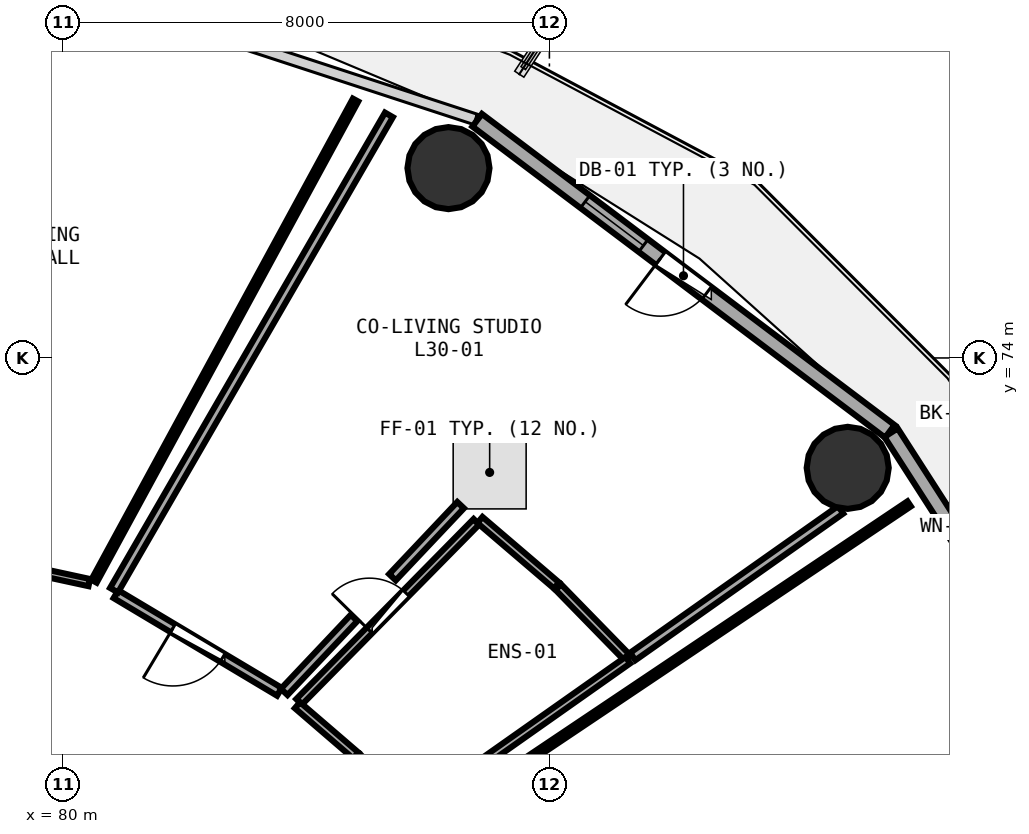
"""IFC4 building model, lengths in metres.
Left out: names, types, materials, properties, quantities, classifications, styles, units other than length and angle.
Written with IfcOpenShell. Run it as: python <this file> out.ifc"""

import sys

from ifc_helpers import new_model, si_unit, direction, frame, frame_2d, origin, origin_2d, place, context, subcontext, project, spatial, rectangle, circle, extrude, element, fill, save


model = new_model("IFC4")
c1 = context("Model", 3, precision=1e-05, world=origin(), true_north=direction((0.0, 1.0)))
c2 = subcontext(c1, "Body", "Model", "MODEL_VIEW")
j1 = project(units=[si_unit("LENGTHUNIT", "METRE"), si_unit("PLANEANGLEUNIT", "RADIAN")], contexts=[c1])
p1 = place(None, origin())
s1 = spatial("IfcSite", under=j1, at=p1, CompositionType="ELEMENT")
p2 = place(p1, origin())
s2 = spatial("IfcBuilding", under=s1, at=p2, CompositionType="ELEMENT")
p3 = place(p2, frame((0.0, 0.0, 117.6)))
s3 = spatial("IfcBuildingStorey", under=s2, at=p3, CompositionType="ELEMENT", Elevation=117.6)
for number, where, z_axis, x_axis in (
    (1, (92.906, 72.193, 0.0), (0.0, 0.0, 1.0), (1.0, 0.0, 0.0)),
    (2, (86.34, 77.122, 0.0), (0.0, 0.0, 1.0), (1.0, 0.0, 0.0)),
):
    element("IfcColumn", number, at=place(p3, frame(where, z_axis=z_axis, x_axis=x_axis)), inside=s3, PredefinedType="COLUMN", context=c2, shape_type="SweptSolid", body=[
        extrude(circle(Radius=0.675, at=origin_2d()), origin(), (0.0, 0.0, 1.0), 3.75),
    ])
p4 = place(p3, frame((98.048, 65.879, 0.0), z_axis=(0.0, 0.0, 1.0), x_axis=(-0.540620528459, 0.841266571432, 0.0)))
e3 = element("IfcWall", 3, at=p4, inside=s3, PredefinedType="SOLIDWALL", context=c2, shape_type="SweptSolid", body=[
    extrude(rectangle(XDim=8.193, YDim=0.26, at=frame_2d((4.096, 0.0))), origin(), (0.0, 0.0, 1.0), 3.475),
])
p5 = place(p4, frame((3.621, 0.0, 0.0)))
e4 = element("IfcOpeningElement", 4, at=p5, cuts=e3, PredefinedType="OPENING", context=c2, shape_type="SweptSolid", body=[
    extrude(rectangle(XDim=0.95, YDim=2.1, at=frame_2d((0.475, 1.05))), frame((0.0, 0.14, 0.0), z_axis=(0.0, -1.0, 0.0), x_axis=(1.0, 0.0, 0.0)), (0.0, 0.0, 1.0), 0.28),
])
p6 = place(p4, frame((4.921, 0.0, 0.85)))
e5 = element("IfcOpeningElement", 5, at=p6, cuts=e3, PredefinedType="OPENING", context=c2, shape_type="SweptSolid", body=[
    extrude(rectangle(XDim=1.2, YDim=1.45, at=frame_2d((0.6, 0.725))), frame((0.0, 0.14, 0.0), z_axis=(0.0, -1.0, 0.0), x_axis=(1.0, 0.0, 0.0)), (0.0, 0.0, 1.0), 0.28),
])
p7 = place(p3, frame((93.599, 72.793, 0.0), z_axis=(0.0, 0.0, 1.0), x_axis=(-0.798501507879, 0.601992808857, 0.0)))
e6 = element("IfcWall", 6, at=p7, inside=s3, PredefinedType="SOLIDWALL", context=c2, shape_type="SweptSolid", body=[
    extrude(rectangle(XDim=8.499, YDim=0.26, at=frame_2d((4.25, 0.0))), origin(), (0.0, 0.0, 1.0), 3.475),
])
p8 = place(p7, frame((3.775, 0.0, 0.0)))
e7 = element("IfcOpeningElement", 7, at=p8, cuts=e6, PredefinedType="OPENING", context=c2, shape_type="SweptSolid", body=[
    extrude(rectangle(XDim=0.95, YDim=2.1, at=frame_2d((0.475, 1.05))), frame((0.0, 0.14, 0.0), z_axis=(0.0, -1.0, 0.0), x_axis=(1.0, 0.0, 0.0)), (0.0, 0.0, 1.0), 0.28),
])
p9 = place(p7, frame((5.075, 0.0, 0.85)))
e8 = element("IfcOpeningElement", 8, at=p9, cuts=e6, PredefinedType="OPENING", context=c2, shape_type="SweptSolid", body=[
    extrude(rectangle(XDim=1.2, YDim=1.45, at=frame_2d((0.6, 0.725))), frame((0.0, 0.14, 0.0), z_axis=(0.0, -1.0, 0.0), x_axis=(1.0, 0.0, 0.0)), (0.0, 0.0, 1.0), 0.28),
])
p10 = place(p3, frame((83.883, 68.345, 0.0), z_axis=(0.0, 0.0, 1.0), x_axis=(0.70168270288, 0.712489567979, 0.0)))
e9 = element("IfcWall", 9, at=p10, inside=s3, PredefinedType="PLUMBINGWALL", context=c2, shape_type="SweptSolid", body=[
    extrude(rectangle(XDim=4.157, YDim=0.13, at=frame_2d((2.078, 0.0))), origin(), (0.0, 0.0, 1.0), 3.175),
])
p11 = place(p10, frame((1.648, 0.0, 0.0)))
e10 = element("IfcOpeningElement", 10, at=p11, cuts=e9, PredefinedType="OPENING", context=c2, shape_type="SweptSolid", body=[
    extrude(rectangle(XDim=0.86, YDim=2.05, at=frame_2d((0.43, 1.025))), frame((0.0, 0.075, 0.0), z_axis=(0.0, -1.0, 0.0), x_axis=(1.0, 0.0, 0.0)), (0.0, 0.0, 1.0), 0.15),
])
p12 = place(p3, frame((83.56, 68.51, 0.0), z_axis=(0.0, 0.0, 1.0), x_axis=(-0.858523244826, 0.512774646501, 0.0)))
e11 = element("IfcWall", 11, at=p12, inside=s3, PredefinedType="PARTITIONING", context=c2, shape_type="SweptSolid", body=[
    extrude(rectangle(XDim=3.131, YDim=0.15, at=frame_2d((1.565, 0.0))), origin(), (0.0, 0.0, 1.0), 2.925),
])
p13 = place(p12, frame((1.09, 0.0, 0.0)))
e12 = element("IfcOpeningElement", 12, at=p13, cuts=e11, PredefinedType="OPENING", context=c2, shape_type="SweptSolid", body=[
    extrude(rectangle(XDim=0.95, YDim=2.08, at=frame_2d((0.475, 1.04))), frame((0.0, 0.085, 0.0), z_axis=(0.0, -1.0, 0.0), x_axis=(1.0, 0.0, 0.0)), (0.0, 0.0, 1.0), 0.17),
])
p14 = place(p3, frame((80.432, 70.306, 0.0), z_axis=(0.0, 0.0, 1.0), x_axis=(-0.977331177519, 0.211716247484, 0.0)))
e13 = element("IfcWall", 13, at=p14, inside=s3, PredefinedType="PARTITIONING", context=c2, shape_type="SweptSolid", body=[
    extrude(rectangle(XDim=6.181, YDim=0.12, at=frame_2d((3.09, 0.0))), origin(), (0.0, 0.0, 1.0), 3.235),
])
p15 = place(p14, frame((2.64, 0.0, 0.0)))
e14 = element("IfcOpeningElement", 14, at=p15, cuts=e13, PredefinedType="OPENING", context=c2, shape_type="SweptSolid", body=[
    extrude(rectangle(XDim=0.9, YDim=2.08, at=frame_2d((0.45, 1.04))), frame((0.0, 0.07, 0.0), z_axis=(0.0, -1.0, 0.0), x_axis=(1.0, 0.0, 0.0)), (0.0, 0.0, 1.0), 0.14),
])
p16 = place(p3, frame((85.716, 66.536, 0.0), z_axis=(0.0, 0.0, 1.0), x_axis=(-0.695817197704, 0.718218927194, 0.0)))
e15 = element("IfcWall", 15, at=p16, inside=s3, PredefinedType="PLUMBINGWALL", context=c2, shape_type="SweptSolid", body=[
    extrude(rectangle(XDim=1.253, YDim=0.13, at=frame_2d((0.627, 0.0))), origin(), (0.0, 0.0, 1.0), 2.925),
])
p17 = place(p3, frame((84.815, 67.464, 0.0), z_axis=(0.0, 0.0, 1.0), x_axis=(-0.757933178543, 0.652332198242, 0.0)))
e16 = element("IfcWall", 16, at=p17, inside=s3, PredefinedType="PLUMBINGWALL", context=c2, shape_type="SweptSolid", body=[
    extrude(rectangle(XDim=1.265, YDim=0.13, at=frame_2d((0.632, 0.0))), origin(), (0.0, 0.0, 1.0), 3.48),
])
p18 = place(p3, frame((86.857, 71.336, 0.0), z_axis=(0.0, 0.0, 1.0), x_axis=(0.760056789813, -0.649856658241, 0.0)))
e17 = element("IfcWall", 17, at=p18, inside=s3, PredefinedType="PLUMBINGWALL", context=c2, shape_type="SweptSolid", body=[
    extrude(rectangle(XDim=1.657, YDim=0.13, at=frame_2d((0.829, 0.0))), origin(), (0.0, 0.0, 1.0), 3.48),
])
p19 = place(p3, frame((88.146, 70.232, 0.0), z_axis=(0.0, 0.0, 1.0), x_axis=(0.698431593966, -0.715676818508, 0.0)))
e18 = element("IfcWall", 18, at=p19, inside=s3, PredefinedType="PLUMBINGWALL", context=c2, shape_type="SweptSolid", body=[
    extrude(rectangle(XDim=1.642, YDim=0.13, at=frame_2d((0.821, 0.0))), origin(), (0.0, 0.0, 1.0), 2.925),
])
p20 = place(p3, frame((89.291, 69.031, 0.0), z_axis=(0.0, 0.0, 1.0), x_axis=(-0.817498099131, -0.575931296178, 0.0)))
e19 = element("IfcWall", 19, at=p20, inside=s3, PredefinedType="PLUMBINGWALL", context=c2, shape_type="SweptSolid", body=[
    extrude(rectangle(XDim=4.336, YDim=0.13, at=frame_2d((2.168, 0.0))), origin(), (0.0, 0.0, 1.0), 3.175),
])
p21 = place(p3, frame((80.84, 70.181, 0.0), z_axis=(0.0, 0.0, 1.0), x_axis=(0.500668535271, 0.865639080558, 0.0)))
e20 = element("IfcWall", 20, at=p21, inside=s3, PredefinedType="PARTITIONING", context=c2, shape_type="SweptSolid", body=[
    extrude(rectangle(XDim=9.03, YDim=0.15, at=frame_2d((4.515, 0.0))), origin(), (0.0, 0.0, 1.0), 2.925),
])
p22 = place(p3, frame((92.79, 71.502, 0.0), z_axis=(0.0, 0.0, 1.0), x_axis=(-0.817102044885, -0.576493060015, 0.0)))
e21 = element("IfcWall", 21, at=p22, inside=s3, PredefinedType="PARTITIONING", context=c2, shape_type="SweptSolid", body=[
    extrude(rectangle(XDim=4.185, YDim=0.15, at=frame_2d((2.092, 0.0))), origin(), (0.0, 0.0, 1.0), 3.235),
])
p23 = place(p3, frame((86.54, 71.58, 0.0), z_axis=(0.0, 0.0, 1.0), x_axis=(-0.68661474407, -0.727021453071, 0.0)))
e22 = element("IfcWall", 22, at=p23, inside=s3, PredefinedType="PARTITIONING", context=c2, shape_type="SweptSolid", body=[
    extrude(rectangle(XDim=1.631, YDim=0.15, at=frame_2d((0.816, 0.0))), origin(), (0.0, 0.0, 1.0), 3.175),
])
p24 = place(p3, frame((84.788, 69.725, 0.0), z_axis=(0.0, 0.0, 1.0), x_axis=(-0.686614966265, -0.727021243226, 0.0)))
e23 = element("IfcWall", 23, at=p24, inside=s3, PredefinedType="PARTITIONING", context=c2, shape_type="SweptSolid", body=[
    extrude(rectangle(XDim=1.674, YDim=0.15, at=frame_2d((0.837, 0.0))), origin(), (0.0, 0.0, 1.0), 3.235),
])
p25 = place(p3, frame((84.812, 78.241, 0.0), z_axis=(0.0, 0.0, 1.0), x_axis=(-0.477645693392, -0.878552554822, 0.0)))
e24 = element("IfcWall", 24, at=p25, inside=s3, PredefinedType="PARTITIONING", context=c2, shape_type="SweptSolid", body=[
    extrude(rectangle(XDim=9.007, YDim=0.1, at=frame_2d((4.503, 0.0))), origin(), (0.0, 0.0, 1.0), 2.925),
])
p26 = place(p3, frame((85.989, 66.282, 0.0), z_axis=(0.0, 0.0, 1.0), x_axis=(0.830433607217, 0.557117603388, 0.0)))
e25 = element("IfcWall", 25, at=p26, inside=s3, PredefinedType="PARTITIONING", context=c2, shape_type="SweptSolid", body=[
    extrude(rectangle(XDim=9.546, YDim=0.1, at=frame_2d((4.773, 0.0))), origin(), (0.0, 0.0, 1.0), 2.975),
])
p27 = place(p8, frame((0.95, 0.0, 0.0), z_axis=(0.0, 0.0, 1.0), x_axis=(-1.0, 0.0, 0.0)))
e26 = element("IfcDoor", 26, at=p27, inside=s3, OperationType="SINGLE_SWING_LEFT", PredefinedType="DOOR", context=c2, shape_type="SweptSolid", body=[
    extrude(rectangle(XDim=0.95, YDim=2.1, at=frame_2d((0.475, 1.05))), frame((0.0, 0.025, 0.0), z_axis=(0.0, -1.0, 0.0), x_axis=(1.0, 0.0, 0.0)), (0.0, 0.0, 1.0), 0.05),
])
fill(e7, e26)
p28 = place(p9, origin())
e27 = element("IfcWindow", 27, at=p28, inside=s3, PartitioningType="SINGLE_PANEL", PredefinedType="WINDOW", context=c2, shape_type="SweptSolid", body=[
    extrude(rectangle(XDim=1.2, YDim=1.45, at=frame_2d((0.6, 0.725))), frame((0.0, 0.03, 0.0), z_axis=(0.0, -1.0, 0.0), x_axis=(1.0, 0.0, 0.0)), (0.0, 0.0, 1.0), 0.06),
])
fill(e8, e27)
p29 = place(p11, origin())
e28 = element("IfcDoor", 28, at=p29, inside=s3, OperationType="SINGLE_SWING_LEFT", PredefinedType="DOOR", context=c2, shape_type="SweptSolid", body=[
    extrude(rectangle(XDim=0.86, YDim=2.05, at=frame_2d((0.43, 1.025))), frame((0.0, 0.025, 0.0), z_axis=(0.0, -1.0, 0.0), x_axis=(1.0, 0.0, 0.0)), (0.0, 0.0, 1.0), 0.05),
])
fill(e10, e28)
p30 = place(p13, origin())
e29 = element("IfcDoor", 29, at=p30, inside=s3, OperationType="SINGLE_SWING_RIGHT", PredefinedType="DOOR", context=c2, shape_type="SweptSolid", body=[
    extrude(rectangle(XDim=0.95, YDim=2.08, at=frame_2d((0.475, 1.04))), frame((0.0, 0.025, 0.0), z_axis=(0.0, -1.0, 0.0), x_axis=(1.0, 0.0, 0.0)), (0.0, 0.0, 1.0), 0.05),
])
fill(e12, e29)
save(model, sys.argv[1])
